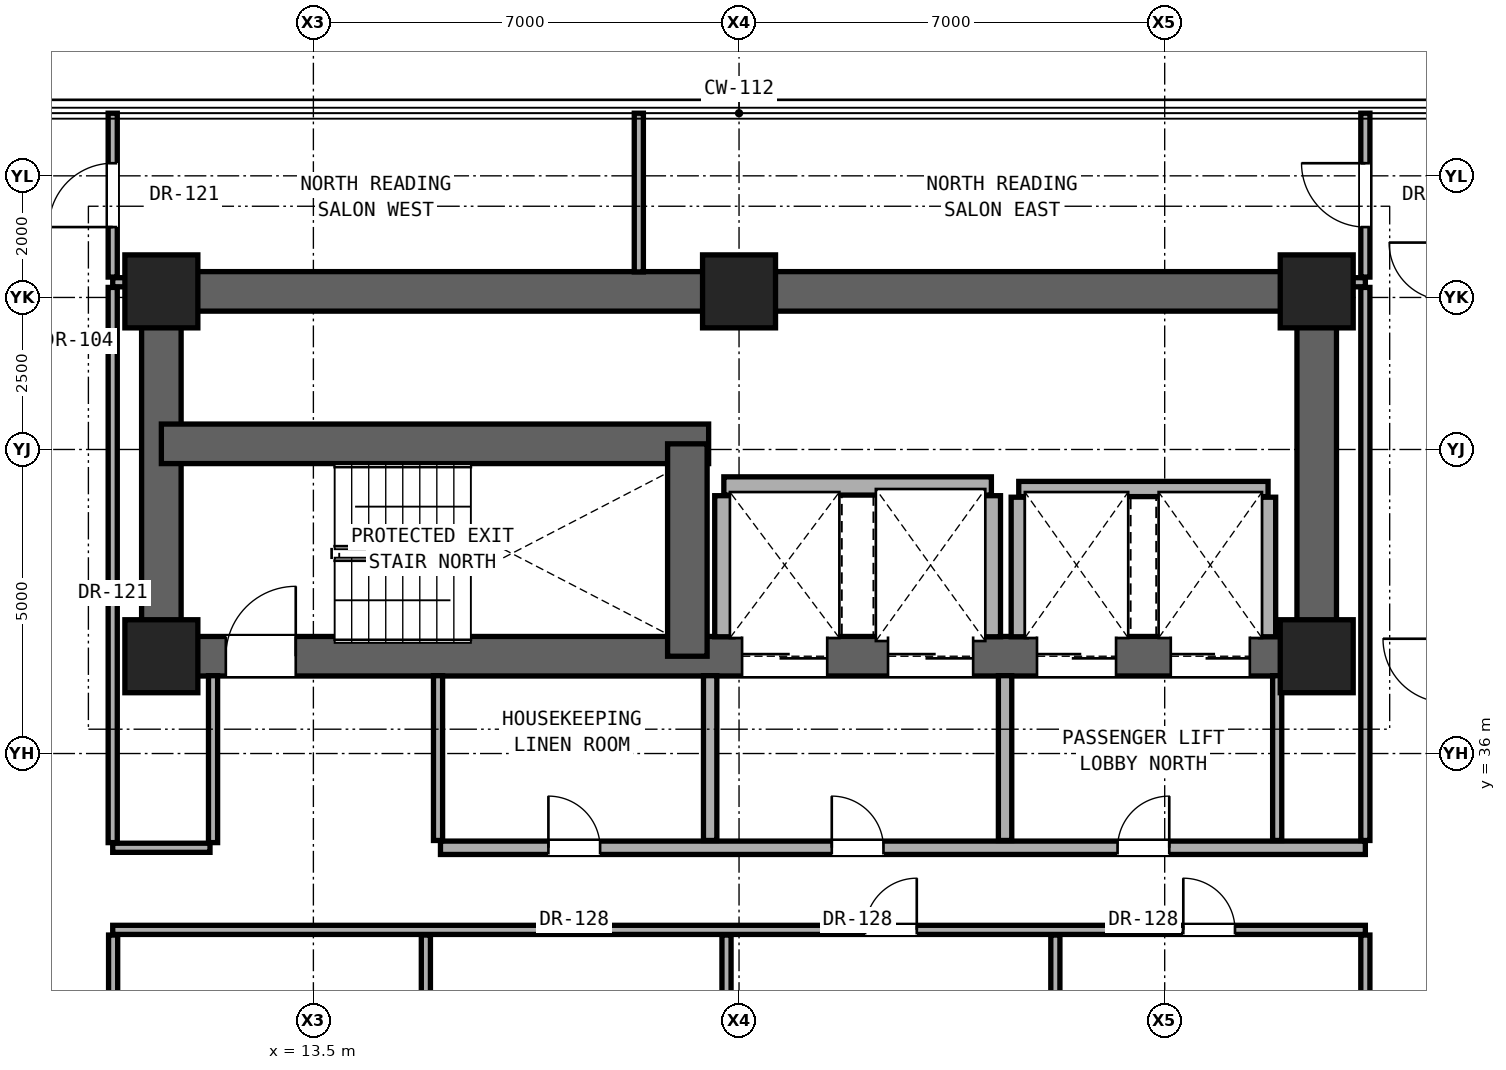
"""IFC4 building model, lengths in metres.
Left out: names, types, materials, properties, quantities, classifications, styles, units other than length and angle.
Written with IfcOpenShell. Run it as: python <this file> out.ifc"""

import sys

from ifc_helpers import new_model, si_unit, direction, frame, frame_2d, origin, origin_2d, place, context, subcontext, project, spatial, rectangle, extrude, element, fill, save


model = new_model("IFC4")
c1 = context("Model", 3, precision=1e-05, world=origin(), true_north=direction((0.0, 1.0)))
c2 = subcontext(c1, "Body", "Model", "MODEL_VIEW")
j1 = project(units=[si_unit("LENGTHUNIT", "METRE"), si_unit("PLANEANGLEUNIT", "RADIAN")], contexts=[c1])
p1 = place(None, origin())
s1 = spatial("IfcSite", under=j1, at=p1, CompositionType="ELEMENT")
p2 = place(p1, origin())
s2 = spatial("IfcBuilding", under=s1, at=p2, CompositionType="ELEMENT")
p3 = place(p2, frame((0.0, 0.0, 88.4)))
s3 = spatial("IfcBuildingStorey", under=s2, at=p3, CompositionType="ELEMENT", Elevation=88.4)
for number, where, z_axis, x_axis in (
    (1, (11.0, 37.6, 0.0), (0.0, 0.0, 1.0), (1.0, 0.0, 0.0)),
    (2, (30.0, 37.6, 0.0), (0.0, 0.0, 1.0), (1.0, 0.0, 0.0)),
    (3, (11.0, 43.6, 0.0), (0.0, 0.0, 1.0), (1.0, 0.0, 0.0)),
    (4, (20.5, 43.6, 0.0), (0.0, 0.0, 1.0), (1.0, 0.0, 0.0)),
    (5, (30.0, 43.6, 0.0), (0.0, 0.0, 1.0), (1.0, 0.0, 0.0)),
):
    element("IfcColumn", number, at=place(p3, frame(where, z_axis=z_axis, x_axis=x_axis)), inside=s3, PredefinedType="COLUMN", context=c2, shape_type="SweptSolid", body=[
        extrude(rectangle(XDim=1.2, YDim=1.2, at=origin_2d()), origin(), (0.0, 0.0, 1.0), 3.3),
    ])
p4 = place(p3, frame((11.0, 43.6, 0.0), z_axis=(0.0, 0.0, 1.0), x_axis=(1.0, 0.0, 0.0)))
e6 = element("IfcWall", 6, at=p4, inside=s3, PredefinedType="SHEAR", context=c2, shape_type="SweptSolid", body=[
    extrude(rectangle(XDim=19.0, YDim=0.65, at=frame_2d((9.5, 0.0))), origin(), (0.0, 0.0, 1.0), 3.08),
])
for number, where, z_axis, x_axis in (
    (7, (11.0, 37.6, 0.0), (0.0, 0.0, 1.0), (0.0, 1.0, 0.0)),
    (8, (30.0, 37.6, 0.0), (0.0, 0.0, 1.0), (0.0, 1.0, 0.0)),
):
    element("IfcWall", number, at=place(p3, frame(where, z_axis=z_axis, x_axis=x_axis)), inside=s3, PredefinedType="SHEAR", context=c2, shape_type="SweptSolid", body=[
        extrude(rectangle(XDim=6.0, YDim=0.65, at=frame_2d((3.0, 0.0))), origin(), (0.0, 0.0, 1.0), 3.08),
    ])
p5 = place(p3, frame((11.0, 37.6, 0.0), z_axis=(0.0, 0.0, 1.0), x_axis=(1.0, 0.0, 0.0)))
e9 = element("IfcWall", 9, at=p5, inside=s3, PredefinedType="SHEAR", context=c2, shape_type="SweptSolid", body=[
    extrude(rectangle(XDim=19.0, YDim=0.65, at=frame_2d((9.5, 0.0))), origin(), (0.0, 0.0, 1.0), 3.08),
])
p6 = place(p5, frame((1.06, 0.0, 0.0)))
e10 = element("IfcOpeningElement", 10, at=p6, cuts=e9, PredefinedType="OPENING", context=c2, shape_type="SweptSolid", body=[
    extrude(rectangle(XDim=1.15, YDim=2.2, at=frame_2d((0.575, 1.1))), frame((0.0, 0.335, 0.0), z_axis=(0.0, -1.0, 0.0), x_axis=(1.0, 0.0, 0.0)), (0.0, 0.0, 1.0), 0.67),
])
p7 = place(p5, frame((9.55, 0.0, 0.0)))
e11 = element("IfcOpeningElement", 11, at=p7, cuts=e9, PredefinedType="OPENING", context=c2, shape_type="SweptSolid", body=[
    extrude(rectangle(XDim=1.4, YDim=2.35, at=frame_2d((0.7, 1.175))), frame((0.0, 0.335, 0.0), z_axis=(0.0, -1.0, 0.0), x_axis=(1.0, 0.0, 0.0)), (0.0, 0.0, 1.0), 0.67),
])
p8 = place(p5, frame((11.95, 0.0, 0.0)))
e12 = element("IfcOpeningElement", 12, at=p8, cuts=e9, PredefinedType="OPENING", context=c2, shape_type="SweptSolid", body=[
    extrude(rectangle(XDim=1.4, YDim=2.35, at=frame_2d((0.7, 1.175))), frame((0.0, 0.335, 0.0), z_axis=(0.0, -1.0, 0.0), x_axis=(1.0, 0.0, 0.0)), (0.0, 0.0, 1.0), 0.67),
])
p9 = place(p5, frame((14.4, 0.0, 0.0)))
e13 = element("IfcOpeningElement", 13, at=p9, cuts=e9, PredefinedType="OPENING", context=c2, shape_type="SweptSolid", body=[
    extrude(rectangle(XDim=1.3, YDim=2.3, at=frame_2d((0.65, 1.15))), frame((0.0, 0.335, 0.0), z_axis=(0.0, -1.0, 0.0), x_axis=(1.0, 0.0, 0.0)), (0.0, 0.0, 1.0), 0.67),
])
p10 = place(p5, frame((16.6, 0.0, 0.0)))
e14 = element("IfcOpeningElement", 14, at=p10, cuts=e9, PredefinedType="OPENING", context=c2, shape_type="SweptSolid", body=[
    extrude(rectangle(XDim=1.3, YDim=2.3, at=frame_2d((0.65, 1.15))), frame((0.0, 0.335, 0.0), z_axis=(0.0, -1.0, 0.0), x_axis=(1.0, 0.0, 0.0)), (0.0, 0.0, 1.0), 0.67),
])
p11 = place(p3, frame((11.0, 41.093, 0.0), z_axis=(0.0, 0.0, 1.0), x_axis=(1.0, 0.0, 0.0)))
e15 = element("IfcWall", 15, at=p11, inside=s3, PredefinedType="SHEAR", context=c2, shape_type="SweptSolid", body=[
    extrude(rectangle(XDim=9.0, YDim=0.65, at=frame_2d((4.5, 0.0))), origin(), (0.0, 0.0, 1.0), 3.08),
])
p12 = place(p3, frame((19.65, 37.6, 0.0), z_axis=(0.0, 0.0, 1.0), x_axis=(0.0, 1.0, 0.0)))
e16 = element("IfcWall", 16, at=p12, inside=s3, PredefinedType="SHEAR", context=c2, shape_type="SweptSolid", body=[
    extrude(rectangle(XDim=3.493, YDim=0.65, at=frame_2d((1.747, 0.0))), origin(), (0.0, 0.0, 1.0), 3.08),
])
p13 = place(p3, frame((10.2, 33.1, 0.0), z_axis=(0.0, 0.0, 1.0), x_axis=(1.0, 0.0, 0.0)))
e17 = element("IfcWall", 17, at=p13, inside=s3, PredefinedType="PARTITIONING", context=c2, shape_type="SweptSolid", body=[
    extrude(rectangle(XDim=20.6, YDim=0.15, at=frame_2d((10.3, 0.0))), origin(), (0.0, 0.0, 1.0), 2.124),
])
p14 = place(p13, frame((12.373, 0.0, 0.0)))
e18 = element("IfcOpeningElement", 18, at=p14, cuts=e17, PredefinedType="OPENING", context=c2, shape_type="SweptSolid", body=[
    extrude(rectangle(XDim=0.85, YDim=2.01, at=frame_2d((0.425, 1.005))), frame((0.0, 0.085, 0.0), z_axis=(0.0, -1.0, 0.0), x_axis=(1.0, 0.0, 0.0)), (0.0, 0.0, 1.0), 0.17),
])
p15 = place(p13, frame((17.606, 0.0, 0.0)))
e19 = element("IfcOpeningElement", 19, at=p15, cuts=e17, PredefinedType="OPENING", context=c2, shape_type="SweptSolid", body=[
    extrude(rectangle(XDim=0.85, YDim=2.01, at=frame_2d((0.425, 1.005))), frame((0.0, 0.085, 0.0), z_axis=(0.0, -1.0, 0.0), x_axis=(1.0, 0.0, 0.0)), (0.0, 0.0, 1.0), 0.17),
])
p16 = place(p3, frame((10.2, 34.45, 0.0), z_axis=(0.0, 0.0, 1.0), x_axis=(1.0, 0.0, 0.0)))
e20 = element("IfcWall", 20, at=p16, inside=s3, PredefinedType="PARTITIONING", context=c2, shape_type="SweptSolid", body=[
    extrude(rectangle(XDim=1.6, YDim=0.15, at=frame_2d((0.8, 0.0))), origin(), (0.0, 0.0, 1.0), 2.124),
])
p17 = place(p3, frame((15.59, 34.45, 0.0), z_axis=(0.0, 0.0, 1.0), x_axis=(1.0, 0.0, 0.0)))
e21 = element("IfcWall", 21, at=p17, inside=s3, PredefinedType="SOLIDWALL", context=c2, shape_type="SweptSolid", body=[
    extrude(rectangle(XDim=15.21, YDim=0.22, at=frame_2d((7.605, 0.0))), origin(), (0.0, 0.0, 1.0), 2.124),
])
p18 = place(p17, frame((6.435, 0.0, 0.0)))
e22 = element("IfcOpeningElement", 22, at=p18, cuts=e21, PredefinedType="OPENING", context=c2, shape_type="SweptSolid", body=[
    extrude(rectangle(XDim=0.85, YDim=2.01, at=frame_2d((0.425, 1.005))), frame((0.0, 0.12, 0.0), z_axis=(0.0, -1.0, 0.0), x_axis=(1.0, 0.0, 0.0)), (0.0, 0.0, 1.0), 0.24),
])
p19 = place(p17, frame((11.135, 0.0, 0.0)))
e23 = element("IfcOpeningElement", 23, at=p19, cuts=e21, PredefinedType="OPENING", context=c2, shape_type="SweptSolid", body=[
    extrude(rectangle(XDim=0.85, YDim=2.01, at=frame_2d((0.425, 1.005))), frame((0.0, 0.12, 0.0), z_axis=(0.0, -1.0, 0.0), x_axis=(1.0, 0.0, 0.0)), (0.0, 0.0, 1.0), 0.24),
])
p20 = place(p17, frame((1.775, 0.0, 0.0)))
e24 = element("IfcOpeningElement", 24, at=p20, cuts=e21, PredefinedType="OPENING", context=c2, shape_type="SweptSolid", body=[
    extrude(rectangle(XDim=0.85, YDim=2.01, at=frame_2d((0.425, 1.005))), frame((0.0, 0.12, 0.0), z_axis=(0.0, -1.0, 0.0), x_axis=(1.0, 0.0, 0.0)), (0.0, 0.0, 1.0), 0.24),
])
p21 = place(p3, frame((25.1, 40.35, 0.0), z_axis=(0.0, 0.0, 1.0), x_axis=(1.0, 0.0, 0.0)))
e25 = element("IfcWall", 25, at=p21, inside=s3, PredefinedType="SOLIDWALL", context=c2, shape_type="SweptSolid", body=[
    extrude(rectangle(XDim=4.1, YDim=0.25, at=frame_2d((2.05, 0.0))), origin(), (0.0, 0.0, 1.0), 3.08),
])
p22 = place(p3, frame((20.25, 40.4, 0.0), z_axis=(0.0, 0.0, 1.0), x_axis=(1.0, 0.0, 0.0)))
e26 = element("IfcWall", 26, at=p22, inside=s3, PredefinedType="SOLIDWALL", context=c2, shape_type="SweptSolid", body=[
    extrude(rectangle(XDim=4.4, YDim=0.3, at=frame_2d((2.2, 0.0))), origin(), (0.0, 0.0, 1.0), 3.08),
])
for number, where, z_axis, x_axis in (
    (27, (10.2, 43.75, 0.0), (0.0, 0.0, 1.0), (1.0, 0.0, 0.0)),
    (28, (30.32, 43.75, 0.0), (0.0, 0.0, 1.0), (1.0, 0.0, 0.0)),
):
    element("IfcWall", number, at=place(p3, frame(where, z_axis=z_axis, x_axis=x_axis)), inside=s3, PredefinedType="PARTITIONING", context=c2, shape_type="SweptSolid", body=[
        extrude(rectangle(XDim=0.48, YDim=0.15, at=frame_2d((0.24, 0.0))), origin(), (0.0, 0.0, 1.0), 3.08),
    ])
p23 = place(p3, frame((10.207, 22.935, 0.0), z_axis=(0.0, 0.0, 1.0), x_axis=(0.0, 1.0, 0.0)))
e29 = element("IfcWall", 29, at=p23, inside=s3, PredefinedType="PARTITIONING", context=c2, shape_type="SweptSolid", body=[
    extrude(rectangle(XDim=10.08, YDim=0.15, at=frame_2d((5.04, 0.0))), origin(), (0.0, 0.0, 1.0), 2.299),
])
p24 = place(p23, frame((4.565, 0.0, 0.0)))
e30 = element("IfcOpeningElement", 30, at=p24, cuts=e29, PredefinedType="OPENING", context=c2, shape_type="SweptSolid", body=[
    extrude(rectangle(XDim=0.95, YDim=2.15, at=frame_2d((0.475, 1.075))), frame((0.0, 0.085, 0.0), z_axis=(0.0, -1.0, 0.0), x_axis=(1.0, 0.0, 0.0)), (0.0, 0.0, 1.0), 0.17),
])
p25 = place(p3, frame((10.2, 34.535, 0.0), z_axis=(0.0, 0.0, 1.0), x_axis=(0.0, 1.0, 0.0)))
e31 = element("IfcWall", 31, at=p25, inside=s3, PredefinedType="PARTITIONING", context=c2, shape_type="SweptSolid", body=[
    extrude(rectangle(XDim=9.13, YDim=0.15, at=frame_2d((4.565, 0.0))), origin(), (0.0, 0.0, 1.0), 2.456),
])
p26 = place(p3, frame((10.2, 43.835, 0.0), z_axis=(0.0, 0.0, 1.0), x_axis=(0.0, 1.0, 0.0)))
e32 = element("IfcWall", 32, at=p26, inside=s3, PredefinedType="PARTITIONING", context=c2, shape_type="SweptSolid", body=[
    extrude(rectangle(XDim=2.695, YDim=0.15, at=frame_2d((1.348, 0.0))), origin(), (0.0, 0.0, 1.0), 3.08),
])
p27 = place(p26, frame((0.823, 0.0, 0.0)))
e33 = element("IfcOpeningElement", 33, at=p27, cuts=e32, PredefinedType="OPENING", context=c2, shape_type="SweptSolid", body=[
    extrude(rectangle(XDim=1.05, YDim=2.2, at=frame_2d((0.525, 1.1))), frame((0.0, 0.085, 0.0), z_axis=(0.0, -1.0, 0.0), x_axis=(1.0, 0.0, 0.0)), (0.0, 0.0, 1.0), 0.17),
])
p28 = place(p3, frame((11.85, 34.535, 0.0), z_axis=(0.0, 0.0, 1.0), x_axis=(0.0, 1.0, 0.0)))
e34 = element("IfcWall", 34, at=p28, inside=s3, PredefinedType="PARTITIONING", context=c2, shape_type="SweptSolid", body=[
    extrude(rectangle(XDim=2.745, YDim=0.15, at=frame_2d((1.373, 0.0))), origin(), (0.0, 0.0, 1.0), 3.08),
])
p29 = place(p3, frame((15.35, 22.935, 0.0), z_axis=(0.0, 0.0, 1.0), x_axis=(0.0, 1.0, 0.0)))
e35 = element("IfcWall", 35, at=p29, inside=s3, PredefinedType="PARTITIONING", context=c2, shape_type="SweptSolid", body=[
    extrude(rectangle(XDim=10.08, YDim=0.15, at=frame_2d((5.04, 0.0))), origin(), (0.0, 0.0, 1.0), 2.124),
])
p30 = place(p3, frame((15.55, 34.57, 0.0), z_axis=(0.0, 0.0, 1.0), x_axis=(0.0, 1.0, 0.0)))
e36 = element("IfcWall", 36, at=p30, inside=s3, PredefinedType="PARTITIONING", context=c2, shape_type="SweptSolid", body=[
    extrude(rectangle(XDim=2.71, YDim=0.15, at=frame_2d((1.355, 0.0))), origin(), (0.0, 0.0, 1.0), 2.609),
])
p31 = place(p3, frame((18.852, 43.92, 0.0), z_axis=(0.0, 0.0, 1.0), x_axis=(0.0, 1.0, 0.0)))
e37 = element("IfcWall", 37, at=p31, inside=s3, PredefinedType="PARTITIONING", context=c2, shape_type="SweptSolid", body=[
    extrude(rectangle(XDim=2.61, YDim=0.15, at=frame_2d((1.305, 0.0))), origin(), (0.0, 0.0, 1.0), 3.08),
])
p32 = place(p3, frame((20.025, 34.57, 0.0), z_axis=(0.0, 0.0, 1.0), x_axis=(0.0, 1.0, 0.0)))
e38 = element("IfcWall", 38, at=p32, inside=s3, PredefinedType="SOLIDWALL", context=c2, shape_type="SweptSolid", body=[
    extrude(rectangle(XDim=2.71, YDim=0.22, at=frame_2d((1.355, 0.0))), origin(), (0.0, 0.0, 1.0), 3.08),
])
p33 = place(p3, frame((20.294, 19.985, 0.0), z_axis=(0.0, 0.0, 1.0), x_axis=(0.0, 1.0, 0.0)))
e39 = element("IfcWall", 39, at=p33, inside=s3, PredefinedType="PARTITIONING", context=c2, shape_type="SweptSolid", body=[
    extrude(rectangle(XDim=13.03, YDim=0.15, at=frame_2d((6.515, 0.0))), origin(), (0.0, 0.0, 1.0), 2.124),
])
for number, where, z_axis, x_axis in (
    (40, (20.25, 37.92, 0.0), (0.0, 0.0, 1.0), (0.0, 1.0, 0.0)),
    (41, (24.65, 37.92, 0.0), (0.0, 0.0, 1.0), (0.0, 1.0, 0.0)),
):
    element("IfcWall", number, at=place(p3, frame(where, z_axis=z_axis, x_axis=x_axis)), inside=s3, PredefinedType="SOLIDWALL", context=c2, shape_type="SweptSolid", body=[
        extrude(rectangle(XDim=2.32, YDim=0.3, at=frame_2d((1.16, 0.0))), origin(), (0.0, 0.0, 1.0), 3.08),
    ])
p34 = place(p3, frame((24.875, 34.57, 0.0), z_axis=(0.0, 0.0, 1.0), x_axis=(0.0, 1.0, 0.0)))
e42 = element("IfcWall", 42, at=p34, inside=s3, PredefinedType="SOLIDWALL", context=c2, shape_type="SweptSolid", body=[
    extrude(rectangle(XDim=2.71, YDim=0.22, at=frame_2d((1.355, 0.0))), origin(), (0.0, 0.0, 1.0), 3.08),
])
p35 = place(p3, frame((25.1, 37.92, 0.0), z_axis=(0.0, 0.0, 1.0), x_axis=(0.0, 1.0, 0.0)))
e43 = element("IfcWall", 43, at=p35, inside=s3, PredefinedType="SOLIDWALL", context=c2, shape_type="SweptSolid", body=[
    extrude(rectangle(XDim=2.295, YDim=0.25, at=frame_2d((1.147, 0.0))), origin(), (0.0, 0.0, 1.0), 3.08),
])
p36 = place(p3, frame((25.702, 19.985, 0.0), z_axis=(0.0, 0.0, 1.0), x_axis=(0.0, 1.0, 0.0)))
e44 = element("IfcWall", 44, at=p36, inside=s3, PredefinedType="PARTITIONING", context=c2, shape_type="SweptSolid", body=[
    extrude(rectangle(XDim=13.03, YDim=0.15, at=frame_2d((6.515, 0.0))), origin(), (0.0, 0.0, 1.0), 2.124),
])
p37 = place(p3, frame((29.35, 34.57, 0.0), z_axis=(0.0, 0.0, 1.0), x_axis=(0.0, 1.0, 0.0)))
e45 = element("IfcWall", 45, at=p37, inside=s3, PredefinedType="PARTITIONING", context=c2, shape_type="SweptSolid", body=[
    extrude(rectangle(XDim=2.71, YDim=0.15, at=frame_2d((1.355, 0.0))), origin(), (0.0, 0.0, 1.0), 3.08),
])
p38 = place(p3, frame((29.2, 37.92, 0.0), z_axis=(0.0, 0.0, 1.0), x_axis=(0.0, 1.0, 0.0)))
e46 = element("IfcWall", 46, at=p38, inside=s3, PredefinedType="SOLIDWALL", context=c2, shape_type="SweptSolid", body=[
    extrude(rectangle(XDim=2.295, YDim=0.25, at=frame_2d((1.147, 0.0))), origin(), (0.0, 0.0, 1.0), 3.08),
])
p39 = place(p3, frame((30.8, 19.985, 0.0), z_axis=(0.0, 0.0, 1.0), x_axis=(0.0, 1.0, 0.0)))
e47 = element("IfcWall", 47, at=p39, inside=s3, PredefinedType="PARTITIONING", context=c2, shape_type="SweptSolid", body=[
    extrude(rectangle(XDim=13.03, YDim=0.15, at=frame_2d((6.515, 0.0))), origin(), (0.0, 0.0, 1.0), 2.299),
])
p40 = place(p3, frame((30.8, 34.57, 0.0), z_axis=(0.0, 0.0, 1.0), x_axis=(0.0, 1.0, 0.0)))
e48 = element("IfcWall", 48, at=p40, inside=s3, PredefinedType="PARTITIONING", context=c2, shape_type="SweptSolid", body=[
    extrude(rectangle(XDim=9.095, YDim=0.15, at=frame_2d((4.547, 0.0))), origin(), (0.0, 0.0, 1.0), 2.456),
])
p41 = place(p3, frame((30.8, 43.835, 0.0), z_axis=(0.0, 0.0, 1.0), x_axis=(0.0, 1.0, 0.0)))
e49 = element("IfcWall", 49, at=p41, inside=s3, PredefinedType="PARTITIONING", context=c2, shape_type="SweptSolid", body=[
    extrude(rectangle(XDim=2.695, YDim=0.15, at=frame_2d((1.348, 0.0))), origin(), (0.0, 0.0, 1.0), 3.08),
])
p42 = place(p41, frame((0.823, 0.0, 0.0)))
e50 = element("IfcOpeningElement", 50, at=p42, cuts=e49, PredefinedType="OPENING", context=c2, shape_type="SweptSolid", body=[
    extrude(rectangle(XDim=1.05, YDim=2.2, at=frame_2d((0.525, 1.1))), frame((0.0, 0.085, 0.0), z_axis=(0.0, -1.0, 0.0), x_axis=(1.0, 0.0, 0.0)), (0.0, 0.0, 1.0), 0.17),
])
p43 = place(p6, origin())
e51 = element("IfcDoor", 51, at=p43, inside=s3, OperationType="SINGLE_SWING_RIGHT", PredefinedType="DOOR", context=c2, shape_type="SweptSolid", body=[
    extrude(rectangle(XDim=1.15, YDim=2.2, at=frame_2d((0.575, 1.1))), frame((0.0, 0.025, 0.0), z_axis=(0.0, -1.0, 0.0), x_axis=(1.0, 0.0, 0.0)), (0.0, 0.0, 1.0), 0.05),
])
fill(e10, e51)
p44 = place(p18, origin())
e52 = element("IfcDoor", 52, at=p44, inside=s3, OperationType="SINGLE_SWING_LEFT", PredefinedType="DOOR", context=c2, shape_type="SweptSolid", body=[
    extrude(rectangle(XDim=0.85, YDim=2.01, at=frame_2d((0.425, 1.005))), frame((0.0, 0.025, 0.0), z_axis=(0.0, -1.0, 0.0), x_axis=(1.0, 0.0, 0.0)), (0.0, 0.0, 1.0), 0.05),
])
fill(e22, e52)
p45 = place(p19, origin())
e53 = element("IfcDoor", 53, at=p45, inside=s3, OperationType="SINGLE_SWING_RIGHT", PredefinedType="DOOR", context=c2, shape_type="SweptSolid", body=[
    extrude(rectangle(XDim=0.85, YDim=2.01, at=frame_2d((0.425, 1.005))), frame((0.0, 0.025, 0.0), z_axis=(0.0, -1.0, 0.0), x_axis=(1.0, 0.0, 0.0)), (0.0, 0.0, 1.0), 0.05),
])
fill(e23, e53)
p46 = place(p20, origin())
e54 = element("IfcDoor", 54, at=p46, inside=s3, OperationType="SINGLE_SWING_LEFT", PredefinedType="DOOR", context=c2, shape_type="SweptSolid", body=[
    extrude(rectangle(XDim=0.85, YDim=2.01, at=frame_2d((0.425, 1.005))), frame((0.0, 0.025, 0.0), z_axis=(0.0, -1.0, 0.0), x_axis=(1.0, 0.0, 0.0)), (0.0, 0.0, 1.0), 0.05),
])
fill(e24, e54)
p47 = place(p14, origin())
e55 = element("IfcDoor", 55, at=p47, inside=s3, OperationType="SINGLE_SWING_RIGHT", PredefinedType="DOOR", context=c2, shape_type="SweptSolid", body=[
    extrude(rectangle(XDim=0.85, YDim=2.01, at=frame_2d((0.425, 1.005))), frame((0.0, 0.025, 0.0), z_axis=(0.0, -1.0, 0.0), x_axis=(1.0, 0.0, 0.0)), (0.0, 0.0, 1.0), 0.05),
])
fill(e18, e55)
p48 = place(p15, origin())
e56 = element("IfcDoor", 56, at=p48, inside=s3, OperationType="SINGLE_SWING_LEFT", PredefinedType="DOOR", context=c2, shape_type="SweptSolid", body=[
    extrude(rectangle(XDim=0.85, YDim=2.01, at=frame_2d((0.425, 1.005))), frame((0.0, 0.025, 0.0), z_axis=(0.0, -1.0, 0.0), x_axis=(1.0, 0.0, 0.0)), (0.0, 0.0, 1.0), 0.05),
])
fill(e19, e56)
p49 = place(p27, origin())
e57 = element("IfcDoor", 57, at=p49, inside=s3, OperationType="SINGLE_SWING_LEFT", PredefinedType="DOOR", context=c2, shape_type="SweptSolid", body=[
    extrude(rectangle(XDim=1.05, YDim=2.2, at=frame_2d((0.525, 1.1))), frame((0.0, 0.025, 0.0), z_axis=(0.0, -1.0, 0.0), x_axis=(1.0, 0.0, 0.0)), (0.0, 0.0, 1.0), 0.05),
])
fill(e33, e57)
p50 = place(p42, origin())
e58 = element("IfcDoor", 58, at=p50, inside=s3, OperationType="SINGLE_SWING_RIGHT", PredefinedType="DOOR", context=c2, shape_type="SweptSolid", body=[
    extrude(rectangle(XDim=1.05, YDim=2.2, at=frame_2d((0.525, 1.1))), frame((0.0, 0.025, 0.0), z_axis=(0.0, -1.0, 0.0), x_axis=(1.0, 0.0, 0.0)), (0.0, 0.0, 1.0), 0.05),
])
fill(e50, e58)
p51 = place(p7, origin())
e59 = element("IfcDoor", 59, at=p51, inside=s3, OperationType="DOUBLE_DOOR_SLIDING", PredefinedType="DOOR", context=c2, shape_type="SweptSolid", body=[
    extrude(rectangle(XDim=1.4, YDim=2.35, at=frame_2d((0.7, 1.175))), frame((0.0, 0.025, 0.0), z_axis=(0.0, -1.0, 0.0), x_axis=(1.0, 0.0, 0.0)), (0.0, 0.0, 1.0), 0.05),
])
fill(e11, e59)
p52 = place(p8, origin())
e60 = element("IfcDoor", 60, at=p52, inside=s3, OperationType="DOUBLE_DOOR_SLIDING", PredefinedType="DOOR", context=c2, shape_type="SweptSolid", body=[
    extrude(rectangle(XDim=1.4, YDim=2.35, at=frame_2d((0.7, 1.175))), frame((0.0, 0.025, 0.0), z_axis=(0.0, -1.0, 0.0), x_axis=(1.0, 0.0, 0.0)), (0.0, 0.0, 1.0), 0.05),
])
fill(e12, e60)
p53 = place(p9, origin())
e61 = element("IfcDoor", 61, at=p53, inside=s3, OperationType="DOUBLE_DOOR_SLIDING", PredefinedType="DOOR", context=c2, shape_type="SweptSolid", body=[
    extrude(rectangle(XDim=1.3, YDim=2.3, at=frame_2d((0.65, 1.15))), frame((0.0, 0.025, 0.0), z_axis=(0.0, -1.0, 0.0), x_axis=(1.0, 0.0, 0.0)), (0.0, 0.0, 1.0), 0.05),
])
fill(e13, e61)
p54 = place(p10, origin())
e62 = element("IfcDoor", 62, at=p54, inside=s3, OperationType="DOUBLE_DOOR_SLIDING", PredefinedType="DOOR", context=c2, shape_type="SweptSolid", body=[
    extrude(rectangle(XDim=1.3, YDim=2.3, at=frame_2d((0.65, 1.15))), frame((0.0, 0.025, 0.0), z_axis=(0.0, -1.0, 0.0), x_axis=(1.0, 0.0, 0.0)), (0.0, 0.0, 1.0), 0.05),
])
fill(e14, e62)
save(model, sys.argv[1])
